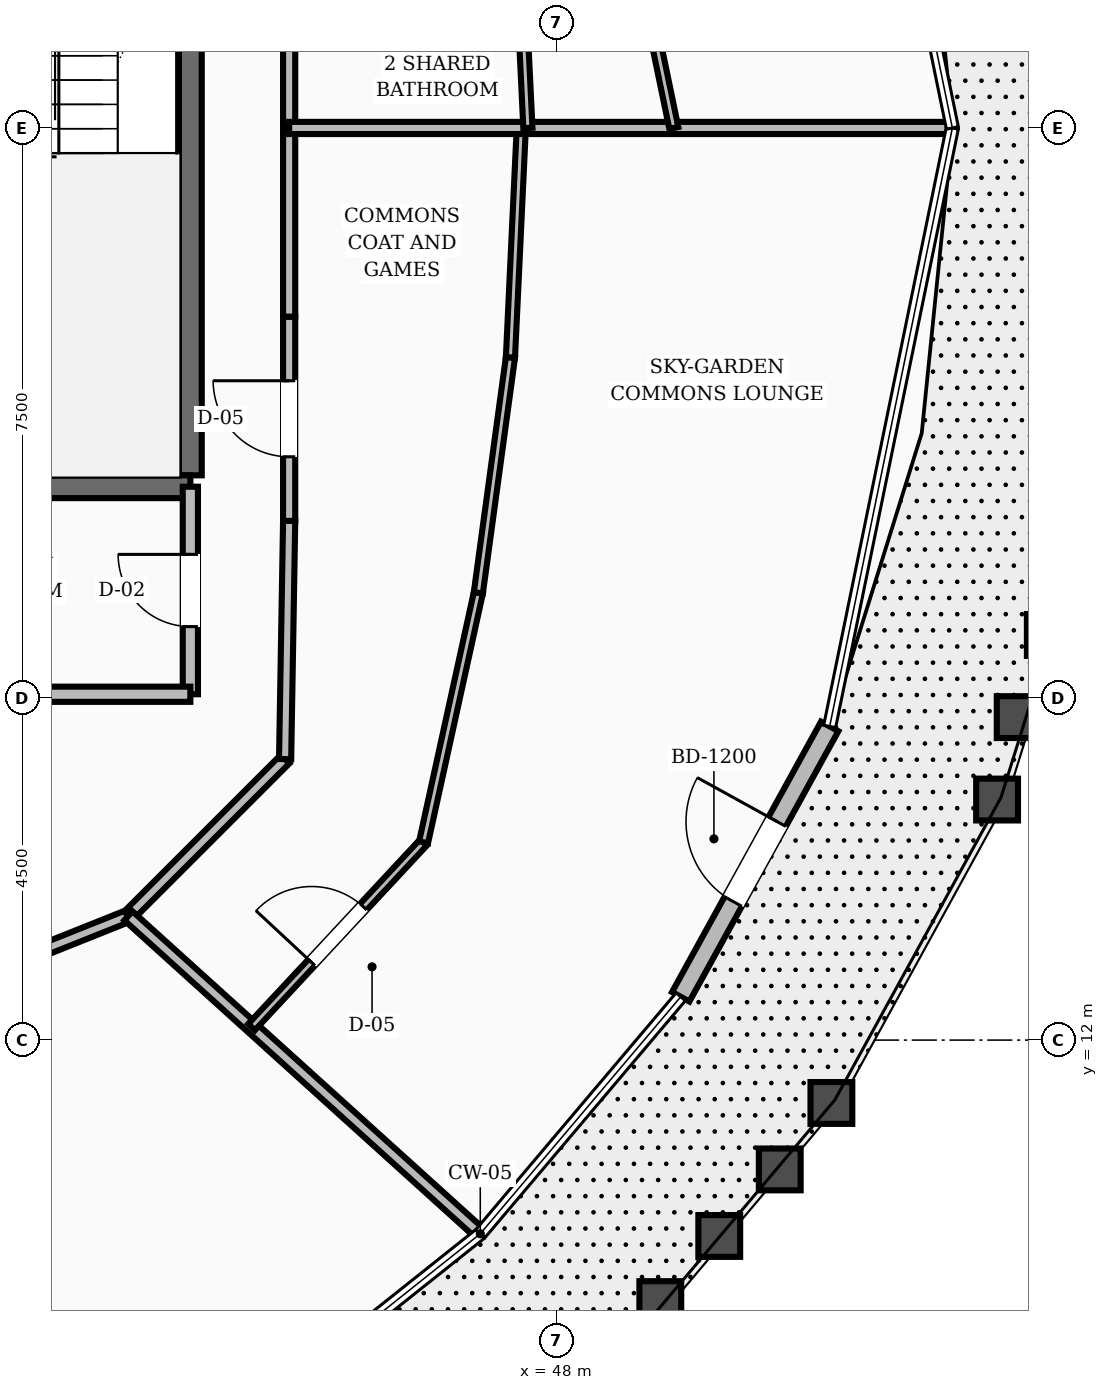
"""IFC4 building model, lengths in metres.
Left out: names, types, materials, properties, quantities, classifications, styles, units other than length and angle.
Written with IfcOpenShell. Run it as: python <this file> out.ifc"""

import sys

from ifc_helpers import new_model, si_unit, direction, frame, frame_2d, origin, place, context, subcontext, project, spatial, rectangle, extrude, element, fill, save


model = new_model("IFC4")
c1 = context("Model", 3, precision=1e-05, world=origin(), true_north=direction((0.0, 1.0)))
c2 = subcontext(c1, "Body", "Model", "MODEL_VIEW")
j1 = project(units=[si_unit("LENGTHUNIT", "METRE"), si_unit("PLANEANGLEUNIT", "RADIAN")], contexts=[c1])
p1 = place(None, origin())
s1 = spatial("IfcSite", under=j1, at=p1, CompositionType="ELEMENT")
p2 = place(p1, origin())
s2 = spatial("IfcBuilding", under=s1, at=p2, CompositionType="ELEMENT")
p3 = place(p2, frame((0.0, 0.0, 240.0)))
s3 = spatial("IfcBuildingStorey", under=s2, at=p3, CompositionType="ELEMENT", Elevation=240.0)
p4 = place(p3, frame((43.18, 19.43, 0.0), z_axis=(0.0, 0.0, 1.0), x_axis=(0.0, 1.0, 0.0)))
e1 = element("IfcWall", 1, at=p4, inside=s3, PredefinedType="SHEAR", context=c2, shape_type="SweptSolid", body=[
    extrude(rectangle(XDim=8.74, YDim=0.3, at=frame_2d((4.37, 0.0))), origin(), (0.0, 0.0, 1.0), 3.6),
])
p5 = place(p3, frame((39.58, 19.28, 0.0), z_axis=(0.0, 0.0, 1.0), x_axis=(1.0, 0.0, 0.0)))
e2 = element("IfcWall", 2, at=p5, inside=s3, PredefinedType="SHEAR", context=c2, shape_type="SweptSolid", body=[
    extrude(rectangle(XDim=3.6, YDim=0.3, at=frame_2d((1.8, 0.0))), origin(), (0.0, 0.0, 1.0), 3.6),
])
p6 = place(p3, frame((49.632, 12.57, 0.0), z_axis=(0.0, 0.0, 1.0), x_axis=(0.482567107431, 0.875858999397, 0.0)))
e3 = element("IfcWall", 3, at=p6, inside=s3, PredefinedType="STANDARD", context=c2, shape_type="SweptSolid", body=[
    extrude(rectangle(XDim=4.061, YDim=0.26, at=frame_2d((2.031, 0.0))), origin(), (0.0, 0.0, 1.0), 2.88),
])
p7 = place(p6, frame((1.43, 0.0, 0.0)))
e4 = element("IfcOpeningElement", 4, at=p7, cuts=e3, PredefinedType="OPENING", context=c2, shape_type="SweptSolid", body=[
    extrude(rectangle(XDim=1.2, YDim=2.15, at=frame_2d((0.6, 1.075))), frame((0.0, 0.14, 0.0), z_axis=(0.0, -1.0, 0.0), x_axis=(1.0, 0.0, 0.0)), (0.0, 0.0, 1.0), 0.28),
])
p8 = place(p3, frame((43.18, 16.55, 0.0), z_axis=(0.0, 0.0, 1.0), x_axis=(0.0, 1.0, 0.0)))
e5 = element("IfcWall", 5, at=p8, inside=s3, PredefinedType="SOLIDWALL", context=c2, shape_type="SweptSolid", body=[
    extrude(rectangle(XDim=2.73, YDim=0.2, at=frame_2d((1.365, 0.0))), origin(), (0.0, 0.0, 1.0), 2.87),
])
p9 = place(p8, frame((0.89, 0.0, 0.0)))
e6 = element("IfcOpeningElement", 6, at=p9, cuts=e5, PredefinedType="OPENING", context=c2, shape_type="SweptSolid", body=[
    extrude(rectangle(XDim=0.95, YDim=2.1, at=frame_2d((0.475, 1.05))), frame((0.0, 0.11, 0.0), z_axis=(0.0, -1.0, 0.0), x_axis=(1.0, 0.0, 0.0)), (0.0, 0.0, 1.0), 0.22),
])
p10 = place(p3, frame((39.2, 16.55, 0.0), z_axis=(0.0, 0.0, 1.0), x_axis=(1.0, 0.0, 0.0)))
e7 = element("IfcWall", 7, at=p10, inside=s3, PredefinedType="SOLIDWALL", context=c2, shape_type="SweptSolid", body=[
    extrude(rectangle(XDim=3.98, YDim=0.2, at=frame_2d((1.99, 0.0))), origin(), (0.0, 0.0, 1.0), 2.87),
])
p11 = place(p3, frame((44.48, 24.0, 0.0), z_axis=(0.0, 0.0, 1.0), x_axis=(0.0, 1.0, 0.0)))
e8 = element("IfcWall", 8, at=p11, inside=s3, PredefinedType="SOLIDWALL", context=c2, shape_type="SweptSolid", body=[
    extrude(rectangle(XDim=2.482, YDim=0.16, at=frame_2d((1.241, 0.0))), origin(), (0.0, 0.0, 1.0), 2.87),
])
p12 = place(p3, frame((39.651, 12.55, 0.0), z_axis=(0.0, 0.0, 1.0), x_axis=(0.92856882165, 0.371160266542, 0.0)))
e9 = element("IfcWall", 9, at=p12, inside=s3, PredefinedType="SOLIDWALL", context=c2, shape_type="SweptSolid", body=[
    extrude(rectangle(XDim=2.923, YDim=0.16, at=frame_2d((1.461, 0.0))), origin(), (0.0, 0.0, 1.0), 2.87),
])
p13 = place(p3, frame((42.365, 13.635, 0.0), z_axis=(0.0, 0.0, 1.0), x_axis=(0.707106781187, 0.707106781187, 0.0)))
e10 = element("IfcWall", 10, at=p13, inside=s3, PredefinedType="SOLIDWALL", context=c2, shape_type="SweptSolid", body=[
    extrude(rectangle(XDim=2.916, YDim=0.16, at=frame_2d((1.458, 0.0))), origin(), (0.0, 0.0, 1.0), 2.87),
])
p14 = place(p3, frame((44.427, 15.697, 0.0), z_axis=(0.0, 0.0, 1.0), x_axis=(0.016981035134, 0.999855811828, 0.0)))
e11 = element("IfcWall", 11, at=p14, inside=s3, PredefinedType="SOLIDWALL", context=c2, shape_type="SweptSolid", body=[
    extrude(rectangle(XDim=3.134, YDim=0.16, at=frame_2d((1.567, 0.0))), origin(), (0.0, 0.0, 1.0), 2.87),
])
p15 = place(p3, frame((44.48, 18.831, 0.0), z_axis=(0.0, 0.0, 1.0), x_axis=(0.0, 1.0, 0.0)))
e12 = element("IfcWall", 12, at=p15, inside=s3, PredefinedType="SOLIDWALL", context=c2, shape_type="SweptSolid", body=[
    extrude(rectangle(XDim=2.687, YDim=0.16, at=frame_2d((1.344, 0.0))), origin(), (0.0, 0.0, 1.0), 2.87),
])
p16 = place(p15, frame((0.844, 0.0, 0.0)))
e13 = element("IfcOpeningElement", 13, at=p16, cuts=e12, PredefinedType="OPENING", context=c2, shape_type="SweptSolid", body=[
    extrude(rectangle(XDim=1.0, YDim=2.1, at=frame_2d((0.5, 1.05))), frame((0.0, 0.09, 0.0), z_axis=(0.0, -1.0, 0.0), x_axis=(1.0, 0.0, 0.0)), (0.0, 0.0, 1.0), 0.18),
])
p17 = place(p3, frame((44.48, 21.518, 0.0), z_axis=(0.0, 0.0, 1.0), x_axis=(0.0, 1.0, 0.0)))
e14 = element("IfcWall", 14, at=p17, inside=s3, PredefinedType="SOLIDWALL", context=c2, shape_type="SweptSolid", body=[
    extrude(rectangle(XDim=2.482, YDim=0.16, at=frame_2d((1.241, 0.0))), origin(), (0.0, 0.0, 1.0), 2.87),
])
p18 = place(p3, frame((42.365, 13.635, 0.0), z_axis=(0.0, 0.0, 1.0), x_axis=(0.741996301963, -0.670403973641, 0.0)))
e15 = element("IfcWall", 15, at=p18, inside=s3, PredefinedType="SOLIDWALL", context=c2, shape_type="SweptSolid", body=[
    extrude(rectangle(XDim=6.189, YDim=0.16, at=frame_2d((3.095, 0.0))), origin(), (0.0, 0.0, 1.0), 2.87),
])
p19 = place(p3, frame((43.985, 12.171, 0.0), z_axis=(0.0, 0.0, 1.0), x_axis=(0.681293610757, 0.732010256719, 0.0)))
e16 = element("IfcWall", 16, at=p19, inside=s3, PredefinedType="PARTITIONING", context=c2, shape_type="SweptSolid", body=[
    extrude(rectangle(XDim=3.322, YDim=0.12, at=frame_2d((1.661, 0.0))), origin(), (0.0, 0.0, 1.0), 2.87),
])
p20 = place(p19, frame((1.161, 0.0, 0.0)))
e17 = element("IfcOpeningElement", 17, at=p20, cuts=e16, PredefinedType="OPENING", context=c2, shape_type="SweptSolid", body=[
    extrude(rectangle(XDim=1.0, YDim=2.1, at=frame_2d((0.5, 1.05))), frame((0.0, 0.07, 0.0), z_axis=(0.0, -1.0, 0.0), x_axis=(1.0, 0.0, 0.0)), (0.0, 0.0, 1.0), 0.14),
])
p21 = place(p3, frame((46.248, 14.602, 0.0), z_axis=(0.0, 0.0, 1.0), x_axis=(0.214483373709, 0.976727639827, 0.0)))
e18 = element("IfcWall", 18, at=p21, inside=s3, PredefinedType="PARTITIONING", context=c2, shape_type="SweptSolid", body=[
    extrude(rectangle(XDim=3.36, YDim=0.12, at=frame_2d((1.68, 0.0))), origin(), (0.0, 0.0, 1.0), 2.87),
])
p22 = place(p3, frame((46.969, 17.884, 0.0), z_axis=(0.0, 0.0, 1.0), x_axis=(0.135109719624, 0.99083064328, 0.0)))
e19 = element("IfcWall", 19, at=p22, inside=s3, PredefinedType="PARTITIONING", context=c2, shape_type="SweptSolid", body=[
    extrude(rectangle(XDim=3.126, YDim=0.12, at=frame_2d((1.563, 0.0))), origin(), (0.0, 0.0, 1.0), 2.87),
])
p23 = place(p3, frame((47.391, 20.982, 0.0), z_axis=(0.0, 0.0, 1.0), x_axis=(0.047185110315, 0.998886162365, 0.0)))
e20 = element("IfcWall", 20, at=p23, inside=s3, PredefinedType="PARTITIONING", context=c2, shape_type="SweptSolid", body=[
    extrude(rectangle(XDim=3.022, YDim=0.12, at=frame_2d((1.511, 0.0))), origin(), (0.0, 0.0, 1.0), 2.87),
])
p24 = place(p3, frame((44.48, 24.0, 0.0), z_axis=(0.0, 0.0, 1.0), x_axis=(1.0, 0.0, 0.0)))
e21 = element("IfcWall", 21, at=p24, inside=s3, PredefinedType="SOLIDWALL", context=c2, shape_type="SweptSolid", body=[
    extrude(rectangle(XDim=8.676, YDim=0.16, at=frame_2d((4.338, 0.0))), origin(), (0.0, 0.0, 1.0), 2.87),
])
p25 = place(p3, frame((47.621, 24.0, 0.0), z_axis=(0.0, 0.0, 1.0), x_axis=(-0.048309856008, 0.998832397258, 0.0)))
e22 = element("IfcWall", 22, at=p25, inside=s3, PredefinedType="PARTITIONING", context=c2, shape_type="SweptSolid", body=[
    extrude(rectangle(XDim=3.037, YDim=0.12, at=frame_2d((1.519, 0.0))), origin(), (0.0, 0.0, 1.0), 2.87),
])
p26 = place(p3, frame((49.541, 24.0, 0.0), z_axis=(0.0, 0.0, 1.0), x_axis=(-0.202796260228, 0.979220954043, 0.0)))
e23 = element("IfcWall", 23, at=p26, inside=s3, PredefinedType="PARTITIONING", context=c2, shape_type="SweptSolid", body=[
    extrude(rectangle(XDim=10.332, YDim=0.12, at=frame_2d((5.166, 0.0))), origin(), (0.0, 0.0, 1.0), 2.87),
])
p27 = place(p26, frame((6.561, 0.0, 0.0)))
e24 = element("IfcOpeningElement", 24, at=p27, cuts=e23, PredefinedType="OPENING", context=c2, shape_type="SweptSolid", body=[
    extrude(rectangle(XDim=0.95, YDim=2.1, at=frame_2d((0.475, 1.05))), frame((0.0, 0.07, 0.0), z_axis=(0.0, -1.0, 0.0), x_axis=(1.0, 0.0, 0.0)), (0.0, 0.0, 1.0), 0.14),
])
p28 = place(p7, origin())
e25 = element("IfcDoor", 25, at=p28, inside=s3, OperationType="SINGLE_SWING_RIGHT", PredefinedType="DOOR", context=c2, shape_type="SweptSolid", body=[
    extrude(rectangle(XDim=1.2, YDim=2.15, at=frame_2d((0.6, 1.075))), frame((0.0, 0.025, 0.0), z_axis=(0.0, -1.0, 0.0), x_axis=(1.0, 0.0, 0.0)), (0.0, 0.0, 1.0), 0.05),
])
fill(e4, e25)
p29 = place(p9, origin())
e26 = element("IfcDoor", 26, at=p29, inside=s3, OperationType="SINGLE_SWING_RIGHT", PredefinedType="DOOR", context=c2, shape_type="SweptSolid", body=[
    extrude(rectangle(XDim=0.95, YDim=2.1, at=frame_2d((0.475, 1.05))), frame((0.0, 0.025, 0.0), z_axis=(0.0, -1.0, 0.0), x_axis=(1.0, 0.0, 0.0)), (0.0, 0.0, 1.0), 0.05),
])
fill(e6, e26)
p30 = place(p16, origin())
e27 = element("IfcDoor", 27, at=p30, inside=s3, OperationType="SINGLE_SWING_RIGHT", PredefinedType="DOOR", context=c2, shape_type="SweptSolid", body=[
    extrude(rectangle(XDim=1.0, YDim=2.1, at=frame_2d((0.5, 1.05))), frame((0.0, 0.025, 0.0), z_axis=(0.0, -1.0, 0.0), x_axis=(1.0, 0.0, 0.0)), (0.0, 0.0, 1.0), 0.05),
])
fill(e13, e27)
p31 = place(p20, origin())
e28 = element("IfcDoor", 28, at=p31, inside=s3, OperationType="SINGLE_SWING_LEFT", PredefinedType="DOOR", context=c2, shape_type="SweptSolid", body=[
    extrude(rectangle(XDim=1.0, YDim=2.1, at=frame_2d((0.5, 1.05))), frame((0.0, 0.025, 0.0), z_axis=(0.0, -1.0, 0.0), x_axis=(1.0, 0.0, 0.0)), (0.0, 0.0, 1.0), 0.05),
])
fill(e17, e28)
save(model, sys.argv[1])
